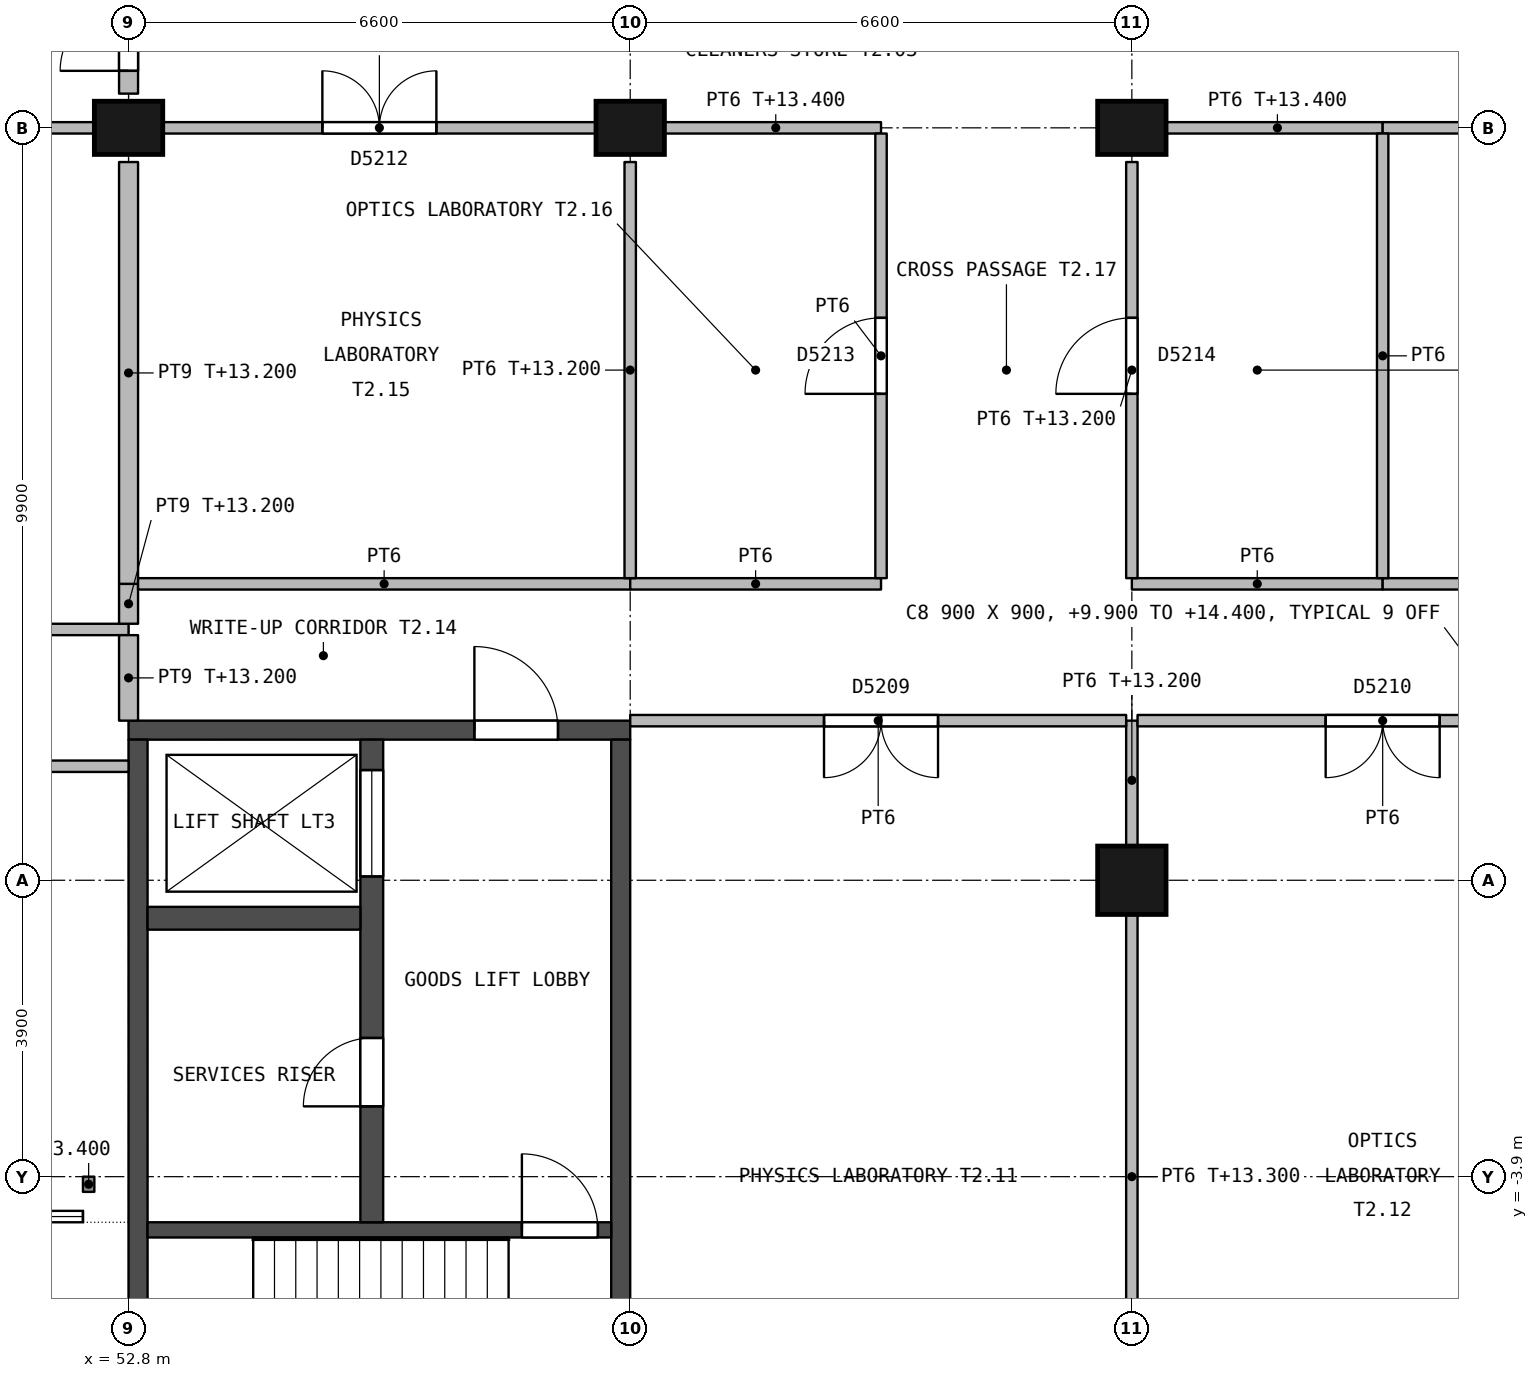
"""IFC4 building model, lengths in metres.
Left out: names, types, materials, properties, quantities, classifications, styles, units other than length and angle.
Written with IfcOpenShell. Run it as: python <this file> out.ifc"""

import sys

from ifc_helpers import new_model, si_unit, direction, frame, frame_2d, origin, origin_2d, place, context, subcontext, project, spatial, rectangle, extrude, element, fill, save


model = new_model("IFC4")
c1 = context("Model", 3, precision=1e-05, world=origin(), true_north=direction((0.0, 1.0)))
c2 = subcontext(c1, "Body", "Model", "MODEL_VIEW")
j1 = project(units=[si_unit("LENGTHUNIT", "METRE"), si_unit("PLANEANGLEUNIT", "RADIAN")], contexts=[c1])
p1 = place(None, origin())
s1 = spatial("IfcSite", under=j1, at=p1, CompositionType="ELEMENT")
p2 = place(p1, origin())
s2 = spatial("IfcBuilding", under=s1, at=p2, CompositionType="ELEMENT")
p3 = place(p2, frame((0.0, 0.0, 9.9)))
s3 = spatial("IfcBuildingStorey", under=s2, at=p3, CompositionType="ELEMENT", Elevation=9.9)
for number, where, z_axis, x_axis in (
    (1, (52.8, 9.9, 0.0), (0.0, 0.0, 1.0), (1.0, 0.0, 0.0)),
    (2, (59.4, 9.9, 0.0), (0.0, 0.0, 1.0), (1.0, 0.0, 0.0)),
):
    element("IfcColumn", number, at=place(p3, frame(where, z_axis=z_axis, x_axis=x_axis)), inside=s3, PredefinedType="COLUMN", context=c2, shape_type="SweptSolid", body=[
        extrude(rectangle(XDim=0.9, YDim=0.7, at=origin_2d()), origin(), (0.0, 0.0, 1.0), 4.5),
    ])
p4 = place(p3, frame((66.0, 0.0, 0.0), z_axis=(0.0, 0.0, 1.0), x_axis=(1.0, 0.0, 0.0)))
e3 = element("IfcColumn", 3, at=p4, inside=s3, PredefinedType="COLUMN", context=c2, shape_type="SweptSolid", body=[
    extrude(rectangle(XDim=0.9, YDim=0.9, at=origin_2d()), origin(), (0.0, 0.0, 1.0), 4.5),
])
p5 = place(p3, frame((66.0, 9.9, 0.0), z_axis=(0.0, 0.0, 1.0), x_axis=(1.0, 0.0, 0.0)))
e4 = element("IfcColumn", 4, at=p5, inside=s3, PredefinedType="COLUMN", context=c2, shape_type="SweptSolid", body=[
    extrude(rectangle(XDim=0.9, YDim=0.7, at=origin_2d()), origin(), (0.0, 0.0, 1.0), 4.5),
])
p6 = place(p3, frame((59.4, 1.975, 0.0), z_axis=(0.0, 0.0, 1.0), x_axis=(-1.0, 0.0, 0.0)))
e5 = element("IfcWall", 5, at=p6, inside=s3, PredefinedType="SHEAR", context=c2, shape_type="SweptSolid", body=[
    extrude(rectangle(XDim=6.6, YDim=0.25, at=frame_2d((3.3, 0.0))), origin(), (0.0, 0.0, 1.0), 4.2),
])
p7 = place(p6, frame((0.95, 0.0, 0.0)))
e6 = element("IfcOpeningElement", 6, at=p7, cuts=e5, PredefinedType="OPENING", context=c2, shape_type="SweptSolid", body=[
    extrude(rectangle(XDim=1.1, YDim=2.1, at=frame_2d((0.55, 1.05))), frame((0.0, 0.135, 0.0), z_axis=(0.0, -1.0, 0.0), x_axis=(1.0, 0.0, 0.0)), (0.0, 0.0, 1.0), 0.27),
])
for number, where, z_axis, x_axis in (
    (7, (59.275, 1.85, 0.0), (0.0, 0.0, 1.0), (0.0, -1.0, 0.0)),
    (8, (52.925, 1.85, 0.0), (0.0, 0.0, 1.0), (0.0, -1.0, 0.0)),
):
    element("IfcWall", number, at=place(p3, frame(where, z_axis=z_axis, x_axis=x_axis)), inside=s3, PredefinedType="SHEAR", context=c2, shape_type="SweptSolid", body=[
        extrude(rectangle(XDim=9.4, YDim=0.25, at=frame_2d((4.7, 0.0))), origin(), (0.0, 0.0, 1.0), 4.2),
    ])
p8 = place(p3, frame((59.15, -4.6, 0.0), z_axis=(0.0, 0.0, 1.0), x_axis=(-1.0, 0.0, 0.0)))
e9 = element("IfcWall", 9, at=p8, inside=s3, PredefinedType="SHEAR", context=c2, shape_type="SweptSolid", body=[
    extrude(rectangle(XDim=6.1, YDim=0.2, at=frame_2d((3.05, 0.0))), origin(), (0.0, 0.0, 1.0), 4.2),
])
p9 = place(p8, frame((0.175, 0.0, 0.0)))
e10 = element("IfcOpeningElement", 10, at=p9, cuts=e9, PredefinedType="OPENING", context=c2, shape_type="SweptSolid", body=[
    extrude(rectangle(XDim=1.0, YDim=2.1, at=frame_2d((0.5, 1.05))), frame((0.0, 0.11, 0.0), z_axis=(0.0, -1.0, 0.0), x_axis=(1.0, 0.0, 0.0)), (0.0, 0.0, 1.0), 0.22),
])
p10 = place(p3, frame((56.0, 1.85, 0.0), z_axis=(0.0, 0.0, 1.0), x_axis=(0.0, -1.0, 0.0)))
e11 = element("IfcWall", 11, at=p10, inside=s3, PredefinedType="SHEAR", context=c2, shape_type="SweptSolid", body=[
    extrude(rectangle(XDim=6.35, YDim=0.3, at=frame_2d((3.175, 0.0))), origin(), (0.0, 0.0, 1.0), 4.2),
])
p11 = place(p10, frame((3.925, 0.0, 0.0)))
e12 = element("IfcOpeningElement", 12, at=p11, cuts=e11, PredefinedType="OPENING", context=c2, shape_type="SweptSolid", body=[
    extrude(rectangle(XDim=0.9, YDim=2.1, at=frame_2d((0.45, 1.05))), frame((0.0, 0.16, 0.0), z_axis=(0.0, -1.0, 0.0), x_axis=(1.0, 0.0, 0.0)), (0.0, 0.0, 1.0), 0.32),
])
p12 = place(p10, frame((0.4, 0.0, 0.0)))
e13 = element("IfcOpeningElement", 13, at=p12, cuts=e11, PredefinedType="OPENING", context=c2, shape_type="SweptSolid", body=[
    extrude(rectangle(XDim=1.4, YDim=2.4, at=frame_2d((0.7, 1.2))), frame((0.0, 0.16, 0.0), z_axis=(0.0, -1.0, 0.0), x_axis=(1.0, 0.0, 0.0)), (0.0, 0.0, 1.0), 0.32),
])
p13 = place(p3, frame((55.85, -0.5, 0.0), z_axis=(0.0, 0.0, 1.0), x_axis=(-1.0, 0.0, 0.0)))
e14 = element("IfcWall", 14, at=p13, inside=s3, PredefinedType="SHEAR", context=c2, shape_type="SweptSolid", body=[
    extrude(rectangle(XDim=2.8, YDim=0.3, at=frame_2d((1.4, 0.0))), origin(), (0.0, 0.0, 1.0), 4.2),
])
p14 = place(p3, frame((52.275, -4.1, 0.0), z_axis=(0.0, 0.0, 1.0), x_axis=(0.0, 1.0, 0.0)))
e15 = element("IfcWall", 15, at=p14, inside=s3, PredefinedType="STANDARD", context=c2, shape_type="SweptSolid", body=[
    extrude(rectangle(XDim=0.2, YDim=0.15, at=frame_2d((0.1, 0.0))), origin(), (0.0, 0.0, 1.0), 3.5),
])
p15 = place(p3, frame((46.6, 9.9, 0.0), z_axis=(0.0, 0.0, 1.0), x_axis=(1.0, 0.0, 0.0)))
e16 = element("IfcWall", 16, at=p15, inside=s3, PredefinedType="PARTITIONING", context=c2, shape_type="SweptSolid", body=[
    extrude(rectangle(XDim=5.75, YDim=0.15, at=frame_2d((2.875, 0.0))), origin(), (0.0, 0.0, 1.0), 3.5),
])
p16 = place(p15, frame((2.15, 0.0, 0.0)))
e17 = element("IfcOpeningElement", 17, at=p16, cuts=e16, PredefinedType="OPENING", context=c2, shape_type="SweptSolid", body=[
    extrude(rectangle(XDim=1.5, YDim=2.1, at=frame_2d((0.75, 1.05))), frame((0.0, 0.085, 0.0), z_axis=(0.0, -1.0, 0.0), x_axis=(1.0, 0.0, 0.0)), (0.0, 0.0, 1.0), 0.17),
])
p17 = place(p3, frame((52.8, 10.35, 0.0), z_axis=(0.0, 0.0, 1.0), x_axis=(0.0, 1.0, 0.0)))
e18 = element("IfcWall", 18, at=p17, inside=s3, PredefinedType="PARTITIONING", context=c2, shape_type="SweptSolid", body=[
    extrude(rectangle(XDim=2.4, YDim=0.25, at=frame_2d((1.2, 0.0))), origin(), (0.0, 0.0, 1.0), 3.6),
])
p18 = place(p17, frame((0.3, 0.0, 0.0)))
e19 = element("IfcOpeningElement", 19, at=p18, cuts=e18, PredefinedType="OPENING", context=c2, shape_type="SweptSolid", body=[
    extrude(rectangle(XDim=1.8, YDim=2.1, at=frame_2d((0.9, 1.05))), frame((0.0, 0.135, 0.0), z_axis=(0.0, -1.0, 0.0), x_axis=(1.0, 0.0, 0.0)), (0.0, 0.0, 1.0), 0.27),
])
p19 = place(p3, frame((52.8, 1.5, 0.0), z_axis=(0.0, 0.0, 1.0), x_axis=(-1.0, 0.0, 0.0)))
e20 = element("IfcWall", 20, at=p19, inside=s3, PredefinedType="PARTITIONING", context=c2, shape_type="SweptSolid", body=[
    extrude(rectangle(XDim=6.525, YDim=0.15, at=frame_2d((3.262, 0.0))), origin(), (0.0, 0.0, 1.0), 4.2),
])
p20 = place(p19, frame((2.55, 0.0, 0.0)))
e21 = element("IfcOpeningElement", 21, at=p20, cuts=e20, PredefinedType="OPENING", context=c2, shape_type="SweptSolid", body=[
    extrude(rectangle(XDim=1.5, YDim=2.1, at=frame_2d((0.75, 1.05))), frame((0.0, 0.085, 0.0), z_axis=(0.0, -1.0, 0.0), x_axis=(1.0, 0.0, 0.0)), (0.0, 0.0, 1.0), 0.17),
])
p21 = place(p3, frame((52.8, 3.3, 0.0), z_axis=(0.0, 0.0, 1.0), x_axis=(-1.0, 0.0, 0.0)))
e22 = element("IfcWall", 22, at=p21, inside=s3, PredefinedType="PARTITIONING", context=c2, shape_type="SweptSolid", body=[
    extrude(rectangle(XDim=6.6, YDim=0.15, at=frame_2d((3.3, 0.0))), origin(), (0.0, 0.0, 1.0), 3.6),
])
p22 = place(p3, frame((52.8, 2.1, 0.0), z_axis=(0.0, 0.0, 1.0), x_axis=(0.0, 1.0, 0.0)))
e23 = element("IfcWall", 23, at=p22, inside=s3, PredefinedType="PARTITIONING", context=c2, shape_type="SweptSolid", body=[
    extrude(rectangle(XDim=1.125, YDim=0.25, at=frame_2d((0.562, 0.0))), origin(), (0.0, 0.0, 1.0), 3.3),
])
p23 = place(p3, frame((52.8, 3.375, 0.0), z_axis=(0.0, 0.0, 1.0), x_axis=(0.0, 1.0, 0.0)))
e24 = element("IfcWall", 24, at=p23, inside=s3, PredefinedType="PARTITIONING", context=c2, shape_type="SweptSolid", body=[
    extrude(rectangle(XDim=0.525, YDim=0.25, at=frame_2d((0.262, 0.0))), origin(), (0.0, 0.0, 1.0), 3.3),
])
p24 = place(p3, frame((52.8, 3.9, 0.0), z_axis=(0.0, 0.0, 1.0), x_axis=(0.0, 1.0, 0.0)))
e25 = element("IfcWall", 25, at=p24, inside=s3, PredefinedType="PARTITIONING", context=c2, shape_type="SweptSolid", body=[
    extrude(rectangle(XDim=5.55, YDim=0.25, at=frame_2d((2.775, 0.0))), origin(), (0.0, 0.0, 1.0), 3.3),
])
p25 = place(p3, frame((53.25, 9.9, 0.0), z_axis=(0.0, 0.0, 1.0), x_axis=(1.0, 0.0, 0.0)))
e26 = element("IfcWall", 26, at=p25, inside=s3, PredefinedType="PARTITIONING", context=c2, shape_type="SweptSolid", body=[
    extrude(rectangle(XDim=5.7, YDim=0.15, at=frame_2d((2.85, 0.0))), origin(), (0.0, 0.0, 1.0), 3.5),
])
p26 = place(p25, frame((2.1, 0.0, 0.0)))
e27 = element("IfcOpeningElement", 27, at=p26, cuts=e26, PredefinedType="OPENING", context=c2, shape_type="SweptSolid", body=[
    extrude(rectangle(XDim=1.5, YDim=2.1, at=frame_2d((0.75, 1.05))), frame((0.0, 0.085, 0.0), z_axis=(0.0, -1.0, 0.0), x_axis=(1.0, 0.0, 0.0)), (0.0, 0.0, 1.0), 0.17),
])
p27 = place(p3, frame((59.85, 9.9, 0.0), z_axis=(0.0, 0.0, 1.0), x_axis=(1.0, 0.0, 0.0)))
e28 = element("IfcWall", 28, at=p27, inside=s3, PredefinedType="PARTITIONING", context=c2, shape_type="SweptSolid", body=[
    extrude(rectangle(XDim=2.85, YDim=0.15, at=frame_2d((1.425, 0.0))), origin(), (0.0, 0.0, 1.0), 3.5),
])
p28 = place(p3, frame((66.45, 9.9, 0.0), z_axis=(0.0, 0.0, 1.0), x_axis=(1.0, 0.0, 0.0)))
e29 = element("IfcWall", 29, at=p28, inside=s3, PredefinedType="PARTITIONING", context=c2, shape_type="SweptSolid", body=[
    extrude(rectangle(XDim=2.85, YDim=0.15, at=frame_2d((1.425, 0.0))), origin(), (0.0, 0.0, 1.0), 3.5),
])
p29 = place(p3, frame((69.3, 9.9, 0.0), z_axis=(0.0, 0.0, 1.0), x_axis=(1.0, 0.0, 0.0)))
e30 = element("IfcWall", 30, at=p29, inside=s3, PredefinedType="PARTITIONING", context=c2, shape_type="SweptSolid", body=[
    extrude(rectangle(XDim=2.85, YDim=0.15, at=frame_2d((1.425, 0.0))), origin(), (0.0, 0.0, 1.0), 3.5),
])
p30 = place(p29, frame((1.25, 0.0, 0.0)))
e31 = element("IfcOpeningElement", 31, at=p30, cuts=e30, PredefinedType="OPENING", context=c2, shape_type="SweptSolid", body=[
    extrude(rectangle(XDim=1.5, YDim=2.1, at=frame_2d((0.75, 1.05))), frame((0.0, 0.085, 0.0), z_axis=(0.0, -1.0, 0.0), x_axis=(1.0, 0.0, 0.0)), (0.0, 0.0, 1.0), 0.17),
])
p31 = place(p3, frame((66.0, -7.35, 0.0), z_axis=(0.0, 0.0, 1.0), x_axis=(0.0, 1.0, 0.0)))
e32 = element("IfcWall", 32, at=p31, inside=s3, PredefinedType="PARTITIONING", context=c2, shape_type="SweptSolid", body=[
    extrude(rectangle(XDim=6.9, YDim=0.15, at=frame_2d((3.45, 0.0))), origin(), (0.0, 0.0, 1.0), 3.4),
])
p32 = place(p3, frame((66.0, 0.45, 0.0), z_axis=(0.0, 0.0, 1.0), x_axis=(0.0, 1.0, 0.0)))
e33 = element("IfcWall", 33, at=p32, inside=s3, PredefinedType="PARTITIONING", context=c2, shape_type="SweptSolid", body=[
    extrude(rectangle(XDim=1.65, YDim=0.15, at=frame_2d((0.825, 0.0))), origin(), (0.0, 0.0, 1.0), 3.3),
])
p33 = place(p3, frame((65.925, 2.1, 0.0), z_axis=(0.0, 0.0, 1.0), x_axis=(-1.0, 0.0, 0.0)))
e34 = element("IfcWall", 34, at=p33, inside=s3, PredefinedType="PARTITIONING", context=c2, shape_type="SweptSolid", body=[
    extrude(rectangle(XDim=6.525, YDim=0.15, at=frame_2d((3.262, 0.0))), origin(), (0.0, 0.0, 1.0), 4.2),
])
p34 = place(p33, frame((2.475, 0.0, 0.0)))
e35 = element("IfcOpeningElement", 35, at=p34, cuts=e34, PredefinedType="OPENING", context=c2, shape_type="SweptSolid", body=[
    extrude(rectangle(XDim=1.5, YDim=2.1, at=frame_2d((0.75, 1.05))), frame((0.0, 0.085, 0.0), z_axis=(0.0, -1.0, 0.0), x_axis=(1.0, 0.0, 0.0)), (0.0, 0.0, 1.0), 0.17),
])
p35 = place(p3, frame((72.525, 2.1, 0.0), z_axis=(0.0, 0.0, 1.0), x_axis=(-1.0, 0.0, 0.0)))
e36 = element("IfcWall", 36, at=p35, inside=s3, PredefinedType="PARTITIONING", context=c2, shape_type="SweptSolid", body=[
    extrude(rectangle(XDim=6.45, YDim=0.15, at=frame_2d((3.225, 0.0))), origin(), (0.0, 0.0, 1.0), 4.2),
])
p36 = place(p35, frame((2.475, 0.0, 0.0)))
e37 = element("IfcOpeningElement", 37, at=p36, cuts=e36, PredefinedType="OPENING", context=c2, shape_type="SweptSolid", body=[
    extrude(rectangle(XDim=1.5, YDim=2.1, at=frame_2d((0.75, 1.05))), frame((0.0, 0.085, 0.0), z_axis=(0.0, -1.0, 0.0), x_axis=(1.0, 0.0, 0.0)), (0.0, 0.0, 1.0), 0.17),
])
p37 = place(p3, frame((59.4, 3.9, 0.0), z_axis=(0.0, 0.0, 1.0), x_axis=(-1.0, 0.0, 0.0)))
e38 = element("IfcWall", 38, at=p37, inside=s3, PredefinedType="PARTITIONING", context=c2, shape_type="SweptSolid", body=[
    extrude(rectangle(XDim=6.475, YDim=0.15, at=frame_2d((3.237, 0.0))), origin(), (0.0, 0.0, 1.0), 4.2),
])
for number, where, z_axis, x_axis in (
    (39, (62.7, 3.9, 0.0), (0.0, 0.0, 1.0), (-1.0, 0.0, 0.0)),
    (40, (69.3, 3.9, 0.0), (0.0, 0.0, 1.0), (-1.0, 0.0, 0.0)),
):
    element("IfcWall", number, at=place(p3, frame(where, z_axis=z_axis, x_axis=x_axis)), inside=s3, PredefinedType="PARTITIONING", context=c2, shape_type="SweptSolid", body=[
        extrude(rectangle(XDim=3.3, YDim=0.15, at=frame_2d((1.65, 0.0))), origin(), (0.0, 0.0, 1.0), 4.2),
    ])
p38 = place(p3, frame((75.9, 3.9, 0.0), z_axis=(0.0, 0.0, 1.0), x_axis=(-1.0, 0.0, 0.0)))
e41 = element("IfcWall", 41, at=p38, inside=s3, PredefinedType="PARTITIONING", context=c2, shape_type="SweptSolid", body=[
    extrude(rectangle(XDim=6.6, YDim=0.15, at=frame_2d((3.3, 0.0))), origin(), (0.0, 0.0, 1.0), 3.3),
])
p39 = place(p3, frame((59.4, 3.975, 0.0), z_axis=(0.0, 0.0, 1.0), x_axis=(0.0, 1.0, 0.0)))
e42 = element("IfcWall", 42, at=p39, inside=s3, PredefinedType="PARTITIONING", context=c2, shape_type="SweptSolid", body=[
    extrude(rectangle(XDim=5.475, YDim=0.15, at=frame_2d((2.737, 0.0))), origin(), (0.0, 0.0, 1.0), 3.3),
])
p40 = place(p3, frame((62.7, 9.825, 0.0), z_axis=(0.0, 0.0, 1.0), x_axis=(0.0, -1.0, 0.0)))
e43 = element("IfcWall", 43, at=p40, inside=s3, PredefinedType="PARTITIONING", context=c2, shape_type="SweptSolid", body=[
    extrude(rectangle(XDim=5.85, YDim=0.15, at=frame_2d((2.925, 0.0))), origin(), (0.0, 0.0, 1.0), 4.2),
])
p41 = place(p40, frame((2.425, 0.0, 0.0)))
e44 = element("IfcOpeningElement", 44, at=p41, cuts=e43, PredefinedType="OPENING", context=c2, shape_type="SweptSolid", body=[
    extrude(rectangle(XDim=1.0, YDim=2.1, at=frame_2d((0.5, 1.05))), frame((0.0, 0.085, 0.0), z_axis=(0.0, -1.0, 0.0), x_axis=(1.0, 0.0, 0.0)), (0.0, 0.0, 1.0), 0.17),
])
p42 = place(p3, frame((66.0, 3.975, 0.0), z_axis=(0.0, 0.0, 1.0), x_axis=(0.0, 1.0, 0.0)))
e45 = element("IfcWall", 45, at=p42, inside=s3, PredefinedType="PARTITIONING", context=c2, shape_type="SweptSolid", body=[
    extrude(rectangle(XDim=5.475, YDim=0.15, at=frame_2d((2.737, 0.0))), origin(), (0.0, 0.0, 1.0), 3.3),
])
p43 = place(p42, frame((2.425, 0.0, 0.0)))
e46 = element("IfcOpeningElement", 46, at=p43, cuts=e45, PredefinedType="OPENING", context=c2, shape_type="SweptSolid", body=[
    extrude(rectangle(XDim=1.0, YDim=2.1, at=frame_2d((0.5, 1.05))), frame((0.0, 0.085, 0.0), z_axis=(0.0, -1.0, 0.0), x_axis=(1.0, 0.0, 0.0)), (0.0, 0.0, 1.0), 0.17),
])
p44 = place(p3, frame((69.3, 3.975, 0.0), z_axis=(0.0, 0.0, 1.0), x_axis=(0.0, 1.0, 0.0)))
e47 = element("IfcWall", 47, at=p44, inside=s3, PredefinedType="PARTITIONING", context=c2, shape_type="SweptSolid", body=[
    extrude(rectangle(XDim=5.85, YDim=0.15, at=frame_2d((2.925, 0.0))), origin(), (0.0, 0.0, 1.0), 4.2),
])
p45 = place(p11, origin())
e48 = element("IfcDoor", 48, at=p45, inside=s3, OperationType="SINGLE_SWING_RIGHT", PredefinedType="DOOR", context=c2, shape_type="SweptSolid", body=[
    extrude(rectangle(XDim=0.9, YDim=2.1, at=frame_2d((0.45, 1.05))), frame((0.0, 0.025, 0.0), z_axis=(0.0, -1.0, 0.0), x_axis=(1.0, 0.0, 0.0)), (0.0, 0.0, 1.0), 0.05),
])
fill(e12, e48)
p46 = place(p7, origin())
e49 = element("IfcDoor", 49, at=p46, inside=s3, OperationType="SINGLE_SWING_RIGHT", PredefinedType="DOOR", context=c2, shape_type="SweptSolid", body=[
    extrude(rectangle(XDim=1.1, YDim=2.1, at=frame_2d((0.55, 1.05))), frame((0.0, 0.025, 0.0), z_axis=(0.0, -1.0, 0.0), x_axis=(1.0, 0.0, 0.0)), (0.0, 0.0, 1.0), 0.05),
])
fill(e6, e49)
p47 = place(p9, origin())
e50 = element("IfcDoor", 50, at=p47, inside=s3, OperationType="SINGLE_SWING_RIGHT", PredefinedType="DOOR", context=c2, shape_type="SweptSolid", body=[
    extrude(rectangle(XDim=1.0, YDim=2.1, at=frame_2d((0.5, 1.05))), frame((0.0, 0.025, 0.0), z_axis=(0.0, -1.0, 0.0), x_axis=(1.0, 0.0, 0.0)), (0.0, 0.0, 1.0), 0.05),
])
fill(e10, e50)
p48 = place(p12, origin())
e51 = element("IfcDoor", 51, at=p48, inside=s3, OperationType="DOUBLE_DOOR_SLIDING", PredefinedType="NOTDEFINED", context=c2, shape_type="SweptSolid", body=[
    extrude(rectangle(XDim=1.4, YDim=2.4, at=frame_2d((0.7, 1.2))), frame((0.0, 0.025, 0.0), z_axis=(0.0, -1.0, 0.0), x_axis=(1.0, 0.0, 0.0)), (0.0, 0.0, 1.0), 0.05),
])
fill(e13, e51)
p49 = place(p18, origin())
e52 = element("IfcDoor", 52, at=p49, inside=s3, OperationType="DOUBLE_DOOR_SINGLE_SWING", PredefinedType="DOOR", context=c2, shape_type="SweptSolid", body=[
    extrude(rectangle(XDim=1.8, YDim=2.1, at=frame_2d((0.9, 1.05))), frame((0.0, 0.03, 0.0), z_axis=(0.0, -1.0, 0.0), x_axis=(1.0, 0.0, 0.0)), (0.0, 0.0, 1.0), 0.06),
])
fill(e19, e52)
p50 = place(p34, origin())
e53 = element("IfcDoor", 53, at=p50, inside=s3, OperationType="DOUBLE_DOOR_SINGLE_SWING", PredefinedType="DOOR", context=c2, shape_type="SweptSolid", body=[
    extrude(rectangle(XDim=1.5, YDim=2.1, at=frame_2d((0.75, 1.05))), frame((0.0, 0.027, 0.0), z_axis=(0.0, -1.0, 0.0), x_axis=(1.0, 0.0, 0.0)), (0.0, 0.0, 1.0), 0.054),
])
fill(e35, e53)
p51 = place(p36, origin())
e54 = element("IfcDoor", 54, at=p51, inside=s3, OperationType="DOUBLE_DOOR_SINGLE_SWING", PredefinedType="DOOR", context=c2, shape_type="SweptSolid", body=[
    extrude(rectangle(XDim=1.5, YDim=2.1, at=frame_2d((0.75, 1.05))), frame((0.0, 0.027, 0.0), z_axis=(0.0, -1.0, 0.0), x_axis=(1.0, 0.0, 0.0)), (0.0, 0.0, 1.0), 0.054),
])
fill(e37, e54)
p52 = place(p26, origin())
e55 = element("IfcDoor", 55, at=p52, inside=s3, OperationType="DOUBLE_DOOR_SINGLE_SWING", PredefinedType="DOOR", context=c2, shape_type="SweptSolid", body=[
    extrude(rectangle(XDim=1.5, YDim=2.1, at=frame_2d((0.75, 1.05))), frame((0.0, 0.027, 0.0), z_axis=(0.0, -1.0, 0.0), x_axis=(1.0, 0.0, 0.0)), (0.0, 0.0, 1.0), 0.054),
])
fill(e27, e55)
p53 = place(p41, origin())
e56 = element("IfcDoor", 56, at=p53, inside=s3, OperationType="SINGLE_SWING_RIGHT", PredefinedType="DOOR", context=c2, shape_type="SweptSolid", body=[
    extrude(rectangle(XDim=1.0, YDim=2.1, at=frame_2d((0.5, 1.05))), frame((0.0, 0.027, 0.0), z_axis=(0.0, -1.0, 0.0), x_axis=(1.0, 0.0, 0.0)), (0.0, 0.0, 1.0), 0.054),
])
fill(e44, e56)
p54 = place(p43, origin())
e57 = element("IfcDoor", 57, at=p54, inside=s3, OperationType="SINGLE_SWING_LEFT", PredefinedType="DOOR", context=c2, shape_type="SweptSolid", body=[
    extrude(rectangle(XDim=1.0, YDim=2.1, at=frame_2d((0.5, 1.05))), frame((0.0, 0.027, 0.0), z_axis=(0.0, -1.0, 0.0), x_axis=(1.0, 0.0, 0.0)), (0.0, 0.0, 1.0), 0.054),
])
fill(e46, e57)
save(model, sys.argv[1])
